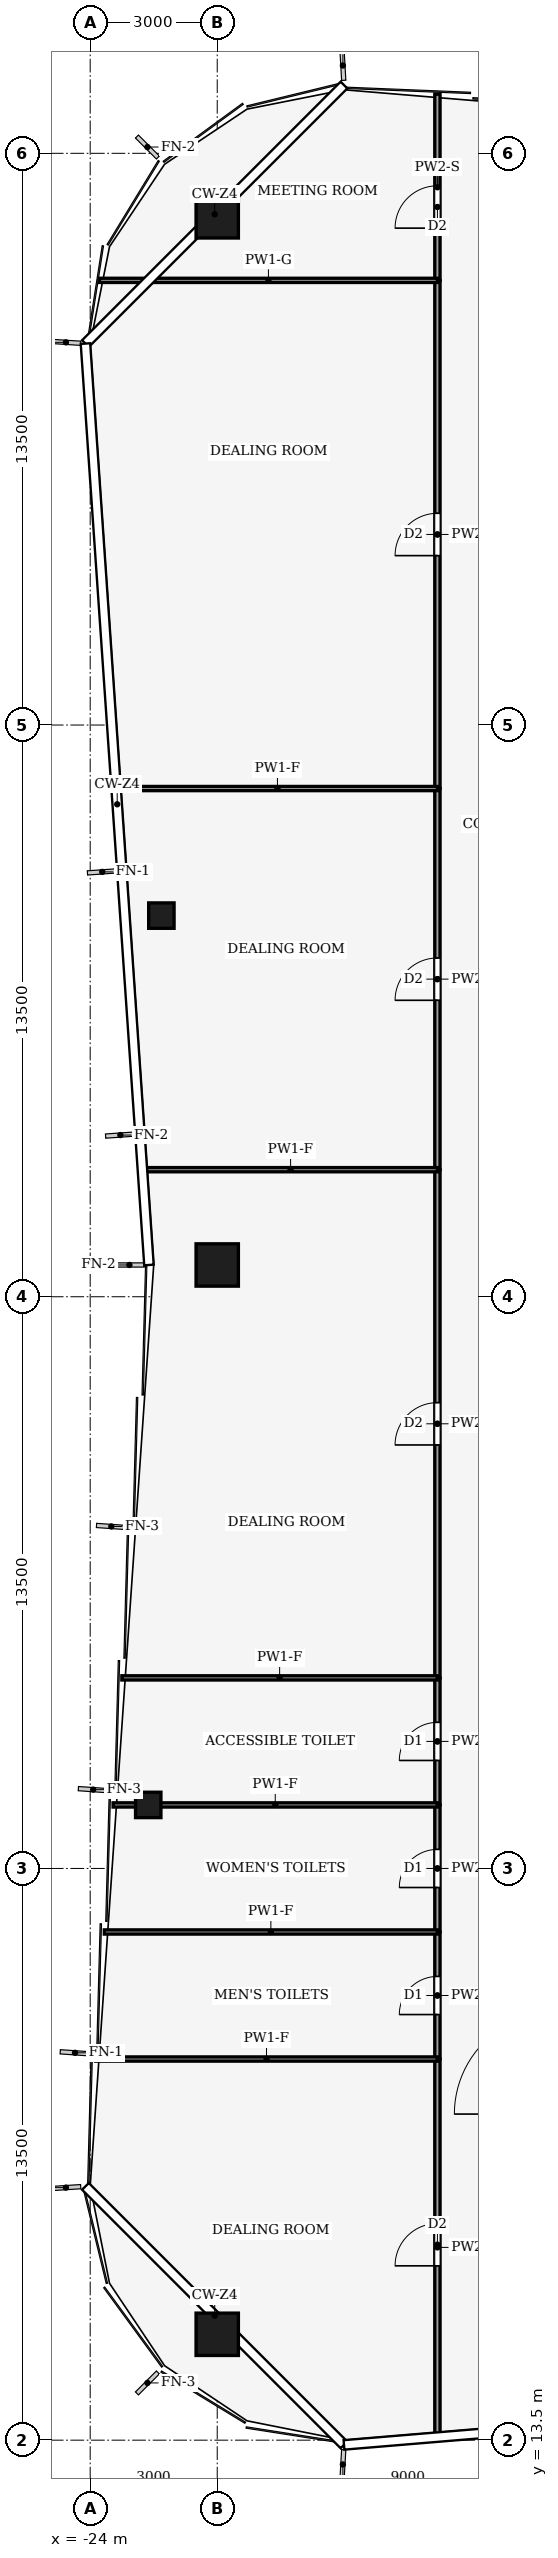
"""IFC4 building model, lengths in metres.
Left out: names, types, materials, properties, quantities, classifications, styles, units other than length and angle.
Written with IfcOpenShell. Run it as: python <this file> out.ifc"""

import sys

from ifc_helpers import new_model, si_unit, direction, frame, frame_2d, origin, origin_2d, place, context, subcontext, project, spatial, rectangle, hollow_rectangle, extrude, element, fill, save


model = new_model("IFC4")
c1 = context("Model", 3, precision=1e-05, world=origin(), true_north=direction((0.0, 1.0)))
c2 = subcontext(c1, "Body", "Model", "MODEL_VIEW")
j1 = project(units=[si_unit("LENGTHUNIT", "METRE"), si_unit("PLANEANGLEUNIT", "RADIAN")], contexts=[c1])
p1 = place(None, origin())
s1 = spatial("IfcSite", under=j1, at=p1, CompositionType="ELEMENT")
p2 = place(p1, origin())
s2 = spatial("IfcBuilding", under=s1, at=p2, CompositionType="ELEMENT")
p3 = place(p2, frame((0.0, 0.0, 250.0)))
s3 = spatial("IfcBuildingStorey", under=s2, at=p3, CompositionType="ELEMENT", Elevation=250.0)
for number, where, z_axis, x_axis in (
    (1, (-21.0, 66.0, 0.0), (0.0, 0.0, 1.0), (1.0, 0.0, 0.0)),
    (2, (-21.0, 16.0, 0.0), (0.0, 0.0, 1.0), (1.0, 0.0, 0.0)),
    (3, (-21.0, 41.25, 0.0), (0.0, 0.0, 1.0), (1.0, 0.0, 0.0)),
):
    element("IfcColumn", number, at=place(p3, frame(where, z_axis=z_axis, x_axis=x_axis)), inside=s3, PredefinedType="COLUMN", context=c2, shape_type="SweptSolid", body=[
        extrude(hollow_rectangle(XDim=1.0, YDim=1.0, WallThickness=0.045, at=origin_2d()), origin(), (0.0, 0.0, 1.0), 4.0),
    ])
for number, where, z_axis, x_axis in (
    (4, (-22.629, 28.5, 0.0), (0.0, 0.0, 1.0), (1.0, 0.0, 0.0)),
    (5, (-22.319, 49.5, 0.0), (0.0, 0.0, 1.0), (1.0, 0.0, 0.0)),
):
    element("IfcColumn", number, at=place(p3, frame(where, z_axis=z_axis, x_axis=x_axis)), inside=s3, PredefinedType="COLUMN", context=c2, shape_type="SweptSolid", body=[
        extrude(hollow_rectangle(XDim=0.6, YDim=0.6, WallThickness=0.025, at=origin_2d()), origin(), (0.0, 0.0, 1.0), 4.0),
    ])
p4 = place(p3, frame((-15.8, 13.603, 0.0), z_axis=(0.0, 0.0, 1.0), x_axis=(0.0, 1.0, 0.0)))
e6 = element("IfcWall", 6, at=p4, inside=s3, PredefinedType="PARTITIONING", context=c2, shape_type="SweptSolid", body=[
    extrude(rectangle(XDim=8.897, YDim=0.125, at=frame_2d((4.448, 0.0))), origin(), (0.0, 0.0, 1.0), 3.04),
])
p5 = place(p4, frame((4.013, 0.0, 0.0)))
e7 = element("IfcOpeningElement", 7, at=p5, cuts=e6, PredefinedType="OPENING", context=c2, shape_type="SweptSolid", body=[
    extrude(rectangle(XDim=1.0, YDim=2.1, at=frame_2d((0.5, 1.05))), frame((0.0, 0.073, 0.0), z_axis=(0.0, -1.0, 0.0), x_axis=(1.0, 0.0, 0.0)), (0.0, 0.0, 1.0), 0.145),
])
p6 = place(p3, frame((-15.8, 22.5, 0.0), z_axis=(0.0, 0.0, 1.0), x_axis=(0.0, 1.0, 0.0)))
e8 = element("IfcWall", 8, at=p6, inside=s3, PredefinedType="PARTITIONING", context=c2, shape_type="SweptSolid", body=[
    extrude(rectangle(XDim=3.0, YDim=0.125, at=frame_2d((1.5, 0.0))), origin(), (0.0, 0.0, 1.0), 3.44),
])
p7 = place(p6, frame((1.05, 0.0, 0.0)))
e9 = element("IfcOpeningElement", 9, at=p7, cuts=e8, PredefinedType="OPENING", context=c2, shape_type="SweptSolid", body=[
    extrude(rectangle(XDim=0.9, YDim=2.1, at=frame_2d((0.45, 1.05))), frame((0.0, 0.073, 0.0), z_axis=(0.0, -1.0, 0.0), x_axis=(1.0, 0.0, 0.0)), (0.0, 0.0, 1.0), 0.145),
])
p8 = place(p3, frame((-15.8, 25.5, 0.0), z_axis=(0.0, 0.0, 1.0), x_axis=(0.0, 1.0, 0.0)))
e10 = element("IfcWall", 10, at=p8, inside=s3, PredefinedType="PARTITIONING", context=c2, shape_type="SweptSolid", body=[
    extrude(rectangle(XDim=3.0, YDim=0.125, at=frame_2d((1.5, 0.0))), origin(), (0.0, 0.0, 1.0), 3.87),
])
p9 = place(p8, frame((1.05, 0.0, 0.0)))
e11 = element("IfcOpeningElement", 11, at=p9, cuts=e10, PredefinedType="OPENING", context=c2, shape_type="SweptSolid", body=[
    extrude(rectangle(XDim=0.9, YDim=2.1, at=frame_2d((0.45, 1.05))), frame((0.0, 0.073, 0.0), z_axis=(0.0, -1.0, 0.0), x_axis=(1.0, 0.0, 0.0)), (0.0, 0.0, 1.0), 0.145),
])
p10 = place(p3, frame((-15.8, 28.5, 0.0), z_axis=(0.0, 0.0, 1.0), x_axis=(0.0, 1.0, 0.0)))
e12 = element("IfcWall", 12, at=p10, inside=s3, PredefinedType="PARTITIONING", context=c2, shape_type="SweptSolid", body=[
    extrude(rectangle(XDim=3.0, YDim=0.125, at=frame_2d((1.5, 0.0))), origin(), (0.0, 0.0, 1.0), 3.87),
])
p11 = place(p10, frame((1.05, 0.0, 0.0)))
e13 = element("IfcOpeningElement", 13, at=p11, cuts=e12, PredefinedType="OPENING", context=c2, shape_type="SweptSolid", body=[
    extrude(rectangle(XDim=0.9, YDim=2.1, at=frame_2d((0.45, 1.05))), frame((0.0, 0.073, 0.0), z_axis=(0.0, -1.0, 0.0), x_axis=(1.0, 0.0, 0.0)), (0.0, 0.0, 1.0), 0.145),
])
p12 = place(p3, frame((-15.8, 31.5, 0.0), z_axis=(0.0, 0.0, 1.0), x_axis=(0.0, 1.0, 0.0)))
e14 = element("IfcWall", 14, at=p12, inside=s3, PredefinedType="PARTITIONING", context=c2, shape_type="SweptSolid", body=[
    extrude(rectangle(XDim=12.0, YDim=0.125, at=frame_2d((6.0, 0.0))), origin(), (0.0, 0.0, 1.0), 3.14),
])
p13 = place(p12, frame((5.5, 0.0, 0.0)))
e15 = element("IfcOpeningElement", 15, at=p13, cuts=e14, PredefinedType="OPENING", context=c2, shape_type="SweptSolid", body=[
    extrude(rectangle(XDim=1.0, YDim=2.1, at=frame_2d((0.5, 1.05))), frame((0.0, 0.073, 0.0), z_axis=(0.0, -1.0, 0.0), x_axis=(1.0, 0.0, 0.0)), (0.0, 0.0, 1.0), 0.145),
])
p14 = place(p3, frame((-15.8, 43.5, 0.0), z_axis=(0.0, 0.0, 1.0), x_axis=(0.0, 1.0, 0.0)))
e16 = element("IfcWall", 16, at=p14, inside=s3, PredefinedType="PARTITIONING", context=c2, shape_type="SweptSolid", body=[
    extrude(rectangle(XDim=9.0, YDim=0.125, at=frame_2d((4.5, 0.0))), origin(), (0.0, 0.0, 1.0), 3.24),
])
p15 = place(p14, frame((4.0, 0.0, 0.0)))
e17 = element("IfcOpeningElement", 17, at=p15, cuts=e16, PredefinedType="OPENING", context=c2, shape_type="SweptSolid", body=[
    extrude(rectangle(XDim=1.0, YDim=2.1, at=frame_2d((0.5, 1.05))), frame((0.0, 0.073, 0.0), z_axis=(0.0, -1.0, 0.0), x_axis=(1.0, 0.0, 0.0)), (0.0, 0.0, 1.0), 0.145),
])
p16 = place(p3, frame((-15.8, 52.5, 0.0), z_axis=(0.0, 0.0, 1.0), x_axis=(0.0, 1.0, 0.0)))
e18 = element("IfcWall", 18, at=p16, inside=s3, PredefinedType="PARTITIONING", context=c2, shape_type="SweptSolid", body=[
    extrude(rectangle(XDim=12.0, YDim=0.125, at=frame_2d((6.0, 0.0))), origin(), (0.0, 0.0, 1.0), 3.87),
])
p17 = place(p16, frame((5.5, 0.0, 0.0)))
e19 = element("IfcOpeningElement", 19, at=p17, cuts=e18, PredefinedType="OPENING", context=c2, shape_type="SweptSolid", body=[
    extrude(rectangle(XDim=1.0, YDim=2.1, at=frame_2d((0.5, 1.05))), frame((0.0, 0.073, 0.0), z_axis=(0.0, -1.0, 0.0), x_axis=(1.0, 0.0, 0.0)), (0.0, 0.0, 1.0), 0.145),
])
p18 = place(p3, frame((-15.8, 64.5, 0.0), z_axis=(0.0, 0.0, 1.0), x_axis=(0.0, 1.0, 0.0)))
e20 = element("IfcWall", 20, at=p18, inside=s3, PredefinedType="PARTITIONING", context=c2, shape_type="SweptSolid", body=[
    extrude(rectangle(XDim=4.397, YDim=0.125, at=frame_2d((2.198, 0.0))), origin(), (0.0, 0.0, 1.0), 3.04),
])
p19 = place(p18, frame((1.233, 0.0, 0.0)))
e21 = element("IfcOpeningElement", 21, at=p19, cuts=e20, PredefinedType="OPENING", context=c2, shape_type="SweptSolid", body=[
    extrude(rectangle(XDim=1.0, YDim=2.1, at=frame_2d((0.5, 1.05))), frame((0.0, 0.073, 0.0), z_axis=(0.0, -1.0, 0.0), x_axis=(1.0, 0.0, 0.0)), (0.0, 0.0, 1.0), 0.145),
])
p20 = place(p3, frame((-15.8, 22.5, 0.0), z_axis=(0.0, 0.0, 1.0), x_axis=(-1.0, 0.0, 0.0)))
e22 = element("IfcWall", 22, at=p20, inside=s3, PredefinedType="PARTITIONING", context=c2, shape_type="SweptSolid", body=[
    extrude(rectangle(XDim=8.073, YDim=0.1, at=frame_2d((4.037, 0.0))), origin(), (0.0, 0.0, 1.0), 3.04),
])
p21 = place(p3, frame((-15.8, 25.5, 0.0), z_axis=(0.0, 0.0, 1.0), x_axis=(-1.0, 0.0, 0.0)))
e23 = element("IfcWall", 23, at=p21, inside=s3, PredefinedType="PARTITIONING", context=c2, shape_type="SweptSolid", body=[
    extrude(rectangle(XDim=7.866, YDim=0.1, at=frame_2d((3.933, 0.0))), origin(), (0.0, 0.0, 1.0), 3.04),
])
p22 = place(p3, frame((-15.8, 28.5, 0.0), z_axis=(0.0, 0.0, 1.0), x_axis=(-1.0, 0.0, 0.0)))
e24 = element("IfcWall", 24, at=p22, inside=s3, PredefinedType="PARTITIONING", context=c2, shape_type="SweptSolid", body=[
    extrude(rectangle(XDim=7.659, YDim=0.1, at=frame_2d((3.83, 0.0))), origin(), (0.0, 0.0, 1.0), 3.04),
])
p23 = place(p3, frame((-15.8, 31.5, 0.0), z_axis=(0.0, 0.0, 1.0), x_axis=(-1.0, 0.0, 0.0)))
e25 = element("IfcWall", 25, at=p23, inside=s3, PredefinedType="PARTITIONING", context=c2, shape_type="SweptSolid", body=[
    extrude(rectangle(XDim=7.452, YDim=0.1, at=frame_2d((3.726, 0.0))), origin(), (0.0, 0.0, 1.0), 3.04),
])
p24 = place(p3, frame((-15.8, 43.5, 0.0), z_axis=(0.0, 0.0, 1.0), x_axis=(-1.0, 0.0, 0.0)))
e26 = element("IfcWall", 26, at=p24, inside=s3, PredefinedType="PARTITIONING", context=c2, shape_type="SweptSolid", body=[
    extrude(rectangle(XDim=6.935, YDim=0.1, at=frame_2d((3.468, 0.0))), origin(), (0.0, 0.0, 1.0), 3.04),
])
p25 = place(p3, frame((-15.8, 52.5, 0.0), z_axis=(0.0, 0.0, 1.0), x_axis=(-1.0, 0.0, 0.0)))
e27 = element("IfcWall", 27, at=p25, inside=s3, PredefinedType="PARTITIONING", context=c2, shape_type="SweptSolid", body=[
    extrude(rectangle(XDim=7.556, YDim=0.1, at=frame_2d((3.778, 0.0))), origin(), (0.0, 0.0, 1.0), 3.04),
])
p26 = place(p3, frame((-15.8, 64.5, 0.0), z_axis=(0.0, 0.0, 1.0), x_axis=(-1.0, 0.0, 0.0)))
e28 = element("IfcWall", 28, at=p26, inside=s3, PredefinedType="PARTITIONING", context=c2, shape_type="SweptSolid", body=[
    extrude(rectangle(XDim=7.981, YDim=0.1, at=frame_2d((3.991, 0.0))), origin(), (0.0, 0.0, 1.0), 2.93),
])
p27 = place(p5, origin())
e29 = element("IfcDoor", 29, at=p27, inside=s3, OperationType="SINGLE_SWING_RIGHT", PredefinedType="DOOR", context=c2, shape_type="SweptSolid", body=[
    extrude(rectangle(XDim=1.0, YDim=2.1, at=frame_2d((0.5, 1.05))), frame((0.0, 0.025, 0.0), z_axis=(0.0, -1.0, 0.0), x_axis=(1.0, 0.0, 0.0)), (0.0, 0.0, 1.0), 0.05),
])
fill(e7, e29)
p28 = place(p7, origin())
e30 = element("IfcDoor", 30, at=p28, inside=s3, OperationType="SINGLE_SWING_RIGHT", PredefinedType="DOOR", context=c2, shape_type="SweptSolid", body=[
    extrude(rectangle(XDim=0.9, YDim=2.1, at=frame_2d((0.45, 1.05))), frame((0.0, 0.025, 0.0), z_axis=(0.0, -1.0, 0.0), x_axis=(1.0, 0.0, 0.0)), (0.0, 0.0, 1.0), 0.05),
])
fill(e9, e30)
p29 = place(p9, origin())
e31 = element("IfcDoor", 31, at=p29, inside=s3, OperationType="SINGLE_SWING_LEFT", PredefinedType="DOOR", context=c2, shape_type="SweptSolid", body=[
    extrude(rectangle(XDim=0.9, YDim=2.1, at=frame_2d((0.45, 1.05))), frame((0.0, 0.025, 0.0), z_axis=(0.0, -1.0, 0.0), x_axis=(1.0, 0.0, 0.0)), (0.0, 0.0, 1.0), 0.05),
])
fill(e11, e31)
p30 = place(p11, origin())
e32 = element("IfcDoor", 32, at=p30, inside=s3, OperationType="SINGLE_SWING_RIGHT", PredefinedType="DOOR", context=c2, shape_type="SweptSolid", body=[
    extrude(rectangle(XDim=0.9, YDim=2.1, at=frame_2d((0.45, 1.05))), frame((0.0, 0.025, 0.0), z_axis=(0.0, -1.0, 0.0), x_axis=(1.0, 0.0, 0.0)), (0.0, 0.0, 1.0), 0.05),
])
fill(e13, e32)
p31 = place(p13, origin())
e33 = element("IfcDoor", 33, at=p31, inside=s3, OperationType="SINGLE_SWING_LEFT", PredefinedType="DOOR", context=c2, shape_type="SweptSolid", body=[
    extrude(rectangle(XDim=1.0, YDim=2.1, at=frame_2d((0.5, 1.05))), frame((0.0, 0.025, 0.0), z_axis=(0.0, -1.0, 0.0), x_axis=(1.0, 0.0, 0.0)), (0.0, 0.0, 1.0), 0.05),
])
fill(e15, e33)
p32 = place(p15, origin())
e34 = element("IfcDoor", 34, at=p32, inside=s3, OperationType="SINGLE_SWING_RIGHT", PredefinedType="DOOR", context=c2, shape_type="SweptSolid", body=[
    extrude(rectangle(XDim=1.0, YDim=2.1, at=frame_2d((0.5, 1.05))), frame((0.0, 0.025, 0.0), z_axis=(0.0, -1.0, 0.0), x_axis=(1.0, 0.0, 0.0)), (0.0, 0.0, 1.0), 0.05),
])
fill(e17, e34)
p33 = place(p17, origin())
e35 = element("IfcDoor", 35, at=p33, inside=s3, OperationType="SINGLE_SWING_LEFT", PredefinedType="DOOR", context=c2, shape_type="SweptSolid", body=[
    extrude(rectangle(XDim=1.0, YDim=2.1, at=frame_2d((0.5, 1.05))), frame((0.0, 0.025, 0.0), z_axis=(0.0, -1.0, 0.0), x_axis=(1.0, 0.0, 0.0)), (0.0, 0.0, 1.0), 0.05),
])
fill(e19, e35)
p34 = place(p19, origin())
e36 = element("IfcDoor", 36, at=p34, inside=s3, OperationType="SINGLE_SWING_LEFT", PredefinedType="DOOR", context=c2, shape_type="SweptSolid", body=[
    extrude(rectangle(XDim=1.0, YDim=2.1, at=frame_2d((0.5, 1.05))), frame((0.0, 0.025, 0.0), z_axis=(0.0, -1.0, 0.0), x_axis=(1.0, 0.0, 0.0)), (0.0, 0.0, 1.0), 0.05),
])
fill(e21, e36)
save(model, sys.argv[1])
